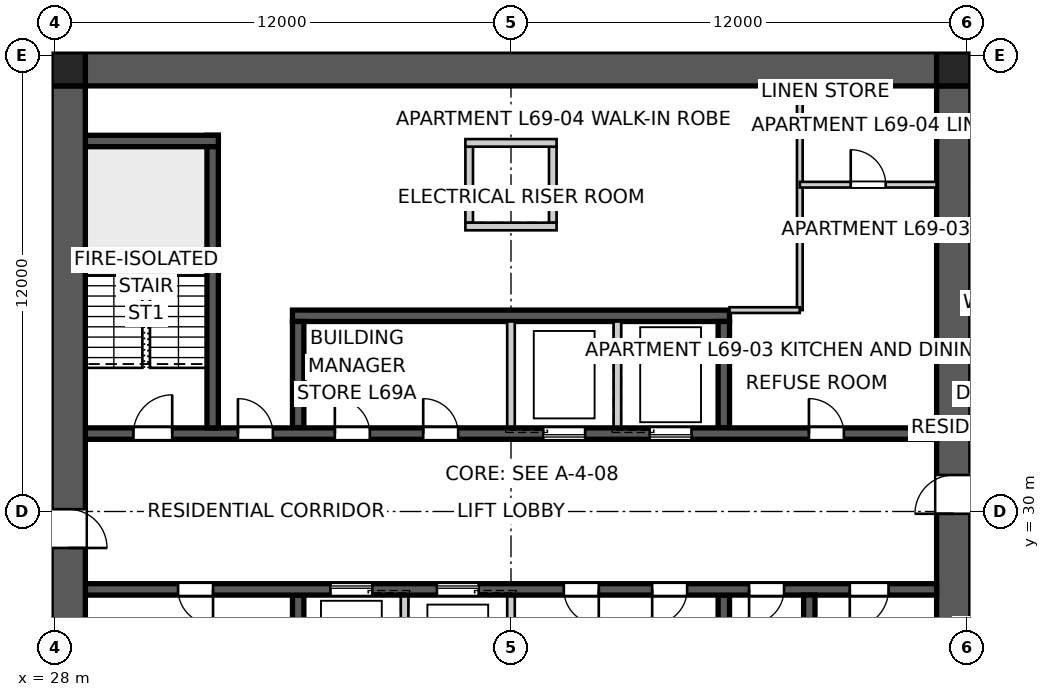
"""IFC4 building model, lengths in metres.
Left out: names, types, materials, properties, quantities, classifications, styles, units other than length and angle.
Written with IfcOpenShell. Run it as: python <this file> out.ifc"""

import sys

from ifc_helpers import new_model, si_unit, direction, frame, frame_2d, origin, origin_2d, place, context, subcontext, project, spatial, polyline, rectangle, outline, extrude, element, fill, save


model = new_model("IFC4")
c1 = context("Model", 3, precision=1e-05, world=origin(), true_north=direction((0.0, 1.0)))
c2 = subcontext(c1, "Body", "Model", "MODEL_VIEW")
j1 = project(units=[si_unit("LENGTHUNIT", "METRE"), si_unit("PLANEANGLEUNIT", "RADIAN")], contexts=[c1])
p1 = place(None, origin())
s1 = spatial("IfcSite", under=j1, at=p1, CompositionType="ELEMENT")
p2 = place(p1, origin())
s2 = spatial("IfcBuilding", under=s1, at=p2, CompositionType="ELEMENT")
p3 = place(p2, frame((0.0, 0.0, 250.6)))
s3 = spatial("IfcBuildingStorey", under=s2, at=p3, CompositionType="ELEMENT", Elevation=250.6)
p4 = place(p3, frame((28.8, 41.65, 0.0), z_axis=(0.0, 0.0, 1.0), x_axis=(1.0, 0.0, 0.0)))
e1 = element("IfcWall", 1, at=p4, inside=s3, PredefinedType="SHEAR", context=c2, shape_type="SweptSolid", body=[
    extrude(outline(polyline([(0.0, -0.45), (22.4, -0.45), (22.4, -0.025), (22.85, -0.025), (22.85, 0.025), (22.4, 0.025), (22.4, 0.45), (0.0, 0.45), (0.0, 0.025), (-0.45, 0.025), (-0.45, -0.025), (0.0, -0.025), (0.0, -0.45)])), origin(), (0.0, 0.0, 1.0), 3.4),
])
p5 = place(p3, frame((51.65, 18.8, 0.0), z_axis=(0.0, 0.0, 1.0), x_axis=(0.0, 1.0, 0.0)))
e2 = element("IfcWall", 2, at=p5, inside=s3, PredefinedType="SHEAR", context=c2, shape_type="SweptSolid", body=[
    extrude(outline(polyline([(0.0, -0.45), (22.4, -0.45), (22.4, -0.025), (22.85, -0.025), (22.85, 0.025), (22.4, 0.025), (22.4, 0.45), (0.0, 0.45), (0.0, 0.025), (-0.45, 0.025), (-0.45, -0.025), (0.0, -0.025), (0.0, -0.45)])), origin(), (0.0, 0.0, 1.0), 3.4),
])
p6 = place(p5, frame((11.14, 0.0, 0.0)))
e3 = element("IfcOpeningElement", 3, at=p6, cuts=e2, PredefinedType="OPENING", context=c2, shape_type="SweptSolid", body=[
    extrude(rectangle(XDim=1.02, YDim=2.4, at=frame_2d((0.51, 1.2))), frame((0.0, 0.46, 0.0), z_axis=(0.0, -1.0, 0.0), x_axis=(1.0, 0.0, 0.0)), (0.0, 0.0, 1.0), 0.92),
])
p7 = place(p3, frame((28.35, 41.2, 0.0), z_axis=(0.0, 0.0, 1.0), x_axis=(0.0, -1.0, 0.0)))
e4 = element("IfcWall", 4, at=p7, inside=s3, PredefinedType="SHEAR", context=c2, shape_type="SweptSolid", body=[
    extrude(outline(polyline([(0.0, -0.45), (22.4, -0.45), (22.4, -0.025), (22.85, -0.025), (22.85, 0.025), (22.4, 0.025), (22.4, 0.45), (0.0, 0.45), (0.0, 0.025), (-0.45, 0.025), (-0.45, -0.025), (0.0, -0.025), (0.0, -0.45)])), origin(), (0.0, 0.0, 1.0), 3.4),
])
p8 = place(p7, frame((11.14, 0.0, 0.0)))
e5 = element("IfcOpeningElement", 5, at=p8, cuts=e4, PredefinedType="OPENING", context=c2, shape_type="SweptSolid", body=[
    extrude(rectangle(XDim=1.02, YDim=2.4, at=frame_2d((0.51, 1.2))), frame((0.0, 0.46, 0.0), z_axis=(0.0, -1.0, 0.0), x_axis=(1.0, 0.0, 0.0)), (0.0, 0.0, 1.0), 0.92),
])
p9 = place(p3, frame((28.8, 32.05, 0.0), z_axis=(0.0, 0.0, 1.0), x_axis=(1.0, 0.0, 0.0)))
e6 = element("IfcWall", 6, at=p9, inside=s3, PredefinedType="SHEAR", context=c2, shape_type="SweptSolid", body=[
    extrude(rectangle(XDim=22.4, YDim=0.3, at=frame_2d((11.2, 0.0))), origin(), (0.0, 0.0, 1.0), 3.4),
])
p10 = place(p9, frame((19.04, 0.0, 0.0)))
e7 = element("IfcOpeningElement", 7, at=p10, cuts=e6, PredefinedType="OPENING", context=c2, shape_type="SweptSolid", body=[
    extrude(rectangle(XDim=0.92, YDim=2.1, at=frame_2d((0.46, 1.05))), frame((0.0, 0.16, 0.0), z_axis=(0.0, -1.0, 0.0), x_axis=(1.0, 0.0, 0.0)), (0.0, 0.0, 1.0), 0.32),
])
p11 = place(p9, frame((1.265, 0.0, 0.0)))
e8 = element("IfcOpeningElement", 8, at=p11, cuts=e6, PredefinedType="OPENING", context=c2, shape_type="SweptSolid", body=[
    extrude(rectangle(XDim=1.02, YDim=2.1, at=frame_2d((0.51, 1.05))), frame((0.0, 0.16, 0.0), z_axis=(0.0, -1.0, 0.0), x_axis=(1.0, 0.0, 0.0)), (0.0, 0.0, 1.0), 0.32),
])
p12 = place(p9, frame((4.015, 0.0, 0.0)))
e9 = element("IfcOpeningElement", 9, at=p12, cuts=e6, PredefinedType="OPENING", context=c2, shape_type="SweptSolid", body=[
    extrude(rectangle(XDim=0.92, YDim=2.1, at=frame_2d((0.46, 1.05))), frame((0.0, 0.16, 0.0), z_axis=(0.0, -1.0, 0.0), x_axis=(1.0, 0.0, 0.0)), (0.0, 0.0, 1.0), 0.32),
])
p13 = place(p9, frame((6.565, 0.0, 0.0)))
e10 = element("IfcOpeningElement", 10, at=p13, cuts=e6, PredefinedType="OPENING", context=c2, shape_type="SweptSolid", body=[
    extrude(rectangle(XDim=0.92, YDim=2.1, at=frame_2d((0.46, 1.05))), frame((0.0, 0.16, 0.0), z_axis=(0.0, -1.0, 0.0), x_axis=(1.0, 0.0, 0.0)), (0.0, 0.0, 1.0), 0.32),
])
p14 = place(p9, frame((8.89, 0.0, 0.0)))
e11 = element("IfcOpeningElement", 11, at=p14, cuts=e6, PredefinedType="OPENING", context=c2, shape_type="SweptSolid", body=[
    extrude(rectangle(XDim=0.92, YDim=2.1, at=frame_2d((0.46, 1.05))), frame((0.0, 0.16, 0.0), z_axis=(0.0, -1.0, 0.0), x_axis=(1.0, 0.0, 0.0)), (0.0, 0.0, 1.0), 0.32),
])
p15 = place(p9, frame((12.05, 0.0, 0.0)))
e12 = element("IfcOpeningElement", 12, at=p15, cuts=e6, PredefinedType="OPENING", context=c2, shape_type="SweptSolid", body=[
    extrude(rectangle(XDim=1.1, YDim=2.1, at=frame_2d((0.55, 1.05))), frame((0.0, 0.16, 0.0), z_axis=(0.0, -1.0, 0.0), x_axis=(1.0, 0.0, 0.0)), (0.0, 0.0, 1.0), 0.32),
])
p16 = place(p9, frame((14.85, 0.0, 0.0)))
e13 = element("IfcOpeningElement", 13, at=p16, cuts=e6, PredefinedType="OPENING", context=c2, shape_type="SweptSolid", body=[
    extrude(rectangle(XDim=1.1, YDim=2.1, at=frame_2d((0.55, 1.05))), frame((0.0, 0.16, 0.0), z_axis=(0.0, -1.0, 0.0), x_axis=(1.0, 0.0, 0.0)), (0.0, 0.0, 1.0), 0.32),
])
p17 = place(p3, frame((51.2, 27.95, 0.0), z_axis=(0.0, 0.0, 1.0), x_axis=(-1.0, 0.0, 0.0)))
e14 = element("IfcWall", 14, at=p17, inside=s3, PredefinedType="SHEAR", context=c2, shape_type="SweptSolid", body=[
    extrude(rectangle(XDim=22.4, YDim=0.3, at=frame_2d((11.2, 0.0))), origin(), (0.0, 0.0, 1.0), 3.4),
])
p18 = place(p17, frame((19.04, 0.0, 0.0)))
e15 = element("IfcOpeningElement", 15, at=p18, cuts=e14, PredefinedType="OPENING", context=c2, shape_type="SweptSolid", body=[
    extrude(rectangle(XDim=0.92, YDim=2.1, at=frame_2d((0.46, 1.05))), frame((0.0, 0.16, 0.0), z_axis=(0.0, -1.0, 0.0), x_axis=(1.0, 0.0, 0.0)), (0.0, 0.0, 1.0), 0.32),
])
p19 = place(p17, frame((1.265, 0.0, 0.0)))
e16 = element("IfcOpeningElement", 16, at=p19, cuts=e14, PredefinedType="OPENING", context=c2, shape_type="SweptSolid", body=[
    extrude(rectangle(XDim=1.02, YDim=2.1, at=frame_2d((0.51, 1.05))), frame((0.0, 0.16, 0.0), z_axis=(0.0, -1.0, 0.0), x_axis=(1.0, 0.0, 0.0)), (0.0, 0.0, 1.0), 0.32),
])
p20 = place(p17, frame((4.015, 0.0, 0.0)))
e17 = element("IfcOpeningElement", 17, at=p20, cuts=e14, PredefinedType="OPENING", context=c2, shape_type="SweptSolid", body=[
    extrude(rectangle(XDim=0.92, YDim=2.1, at=frame_2d((0.46, 1.05))), frame((0.0, 0.16, 0.0), z_axis=(0.0, -1.0, 0.0), x_axis=(1.0, 0.0, 0.0)), (0.0, 0.0, 1.0), 0.32),
])
p21 = place(p17, frame((8.89, 0.0, 0.0)))
e18 = element("IfcOpeningElement", 18, at=p21, cuts=e14, PredefinedType="OPENING", context=c2, shape_type="SweptSolid", body=[
    extrude(rectangle(XDim=0.92, YDim=2.1, at=frame_2d((0.46, 1.05))), frame((0.0, 0.16, 0.0), z_axis=(0.0, -1.0, 0.0), x_axis=(1.0, 0.0, 0.0)), (0.0, 0.0, 1.0), 0.32),
])
p22 = place(p17, frame((6.565, 0.0, 0.0)))
e19 = element("IfcOpeningElement", 19, at=p22, cuts=e14, PredefinedType="OPENING", context=c2, shape_type="SweptSolid", body=[
    extrude(rectangle(XDim=0.92, YDim=2.1, at=frame_2d((0.46, 1.05))), frame((0.0, 0.16, 0.0), z_axis=(0.0, -1.0, 0.0), x_axis=(1.0, 0.0, 0.0)), (0.0, 0.0, 1.0), 0.32),
])
p23 = place(p17, frame((12.05, 0.0, 0.0)))
e20 = element("IfcOpeningElement", 20, at=p23, cuts=e14, PredefinedType="OPENING", context=c2, shape_type="SweptSolid", body=[
    extrude(rectangle(XDim=1.1, YDim=2.1, at=frame_2d((0.55, 1.05))), frame((0.0, 0.16, 0.0), z_axis=(0.0, -1.0, 0.0), x_axis=(1.0, 0.0, 0.0)), (0.0, 0.0, 1.0), 0.32),
])
p24 = place(p17, frame((14.85, 0.0, 0.0)))
e21 = element("IfcOpeningElement", 21, at=p24, cuts=e14, PredefinedType="OPENING", context=c2, shape_type="SweptSolid", body=[
    extrude(rectangle(XDim=1.1, YDim=2.1, at=frame_2d((0.55, 1.05))), frame((0.0, 0.16, 0.0), z_axis=(0.0, -1.0, 0.0), x_axis=(1.0, 0.0, 0.0)), (0.0, 0.0, 1.0), 0.32),
])
p25 = place(p3, frame((34.25, 35.15, 0.0), z_axis=(0.0, 0.0, 1.0), x_axis=(1.0, 0.0, 0.0)))
e22 = element("IfcWall", 22, at=p25, inside=s3, PredefinedType="SHEAR", context=c2, shape_type="SweptSolid", body=[
    extrude(rectangle(XDim=11.5, YDim=0.3, at=frame_2d((5.75, 0.0))), origin(), (0.0, 0.0, 1.0), 3.4),
])
for number, where, z_axis, x_axis in (
    (23, (34.4, 32.2, 0.0), (0.0, 0.0, 1.0), (0.0, 1.0, 0.0)),
    (24, (45.6, 27.8, 0.0), (0.0, 0.0, 1.0), (0.0, -1.0, 0.0)),
):
    element("IfcWall", number, at=place(p3, frame(where, z_axis=z_axis, x_axis=x_axis)), inside=s3, PredefinedType="SHEAR", context=c2, shape_type="SweptSolid", body=[
        extrude(rectangle(XDim=2.8, YDim=0.3, at=frame_2d((1.4, 0.0))), origin(), (0.0, 0.0, 1.0), 3.4),
    ])
for number, where, z_axis, x_axis in (
    (25, (40.0, 32.2, 0.0), (0.0, 0.0, 1.0), (0.0, 1.0, 0.0)),
    (26, (40.0, 27.8, 0.0), (0.0, 0.0, 1.0), (0.0, -1.0, 0.0)),
    (27, (42.8, 32.2, 0.0), (0.0, 0.0, 1.0), (0.0, 1.0, 0.0)),
    (28, (37.2, 27.8, 0.0), (0.0, 0.0, 1.0), (0.0, -1.0, 0.0)),
):
    element("IfcWall", number, at=place(p3, frame(where, z_axis=z_axis, x_axis=x_axis)), inside=s3, PredefinedType="SOLIDWALL", context=c2, shape_type="SweptSolid", body=[
        extrude(rectangle(XDim=2.8, YDim=0.2, at=frame_2d((1.4, 0.0))), origin(), (0.0, 0.0, 1.0), 3.4),
    ])
for number, where, z_axis, x_axis in (
    (29, (45.6, 32.2, 0.0), (0.0, 0.0, 1.0), (0.0, 1.0, 0.0)),
    (30, (34.4, 27.8, 0.0), (0.0, 0.0, 1.0), (0.0, -1.0, 0.0)),
):
    element("IfcWall", number, at=place(p3, frame(where, z_axis=z_axis, x_axis=x_axis)), inside=s3, PredefinedType="SHEAR", context=c2, shape_type="SweptSolid", body=[
        extrude(rectangle(XDim=2.8, YDim=0.3, at=frame_2d((1.4, 0.0))), origin(), (0.0, 0.0, 1.0), 3.4),
    ])
p26 = place(p3, frame((32.15, 32.2, 0.0), z_axis=(0.0, 0.0, 1.0), x_axis=(0.0, 1.0, 0.0)))
e31 = element("IfcWall", 31, at=p26, inside=s3, PredefinedType="SHEAR", context=c2, shape_type="SweptSolid", body=[
    extrude(rectangle(XDim=7.7, YDim=0.3, at=frame_2d((3.85, 0.0))), origin(), (0.0, 0.0, 1.0), 3.4),
])
p27 = place(p3, frame((28.8, 39.75, 0.0), z_axis=(0.0, 0.0, 1.0), x_axis=(1.0, 0.0, 0.0)))
e32 = element("IfcWall", 32, at=p27, inside=s3, PredefinedType="SHEAR", context=c2, shape_type="SweptSolid", body=[
    extrude(rectangle(XDim=3.5, YDim=0.3, at=frame_2d((1.75, 0.0))), origin(), (0.0, 0.0, 1.0), 3.4),
])
p28 = place(p3, frame((47.85, 27.8, 0.0), z_axis=(0.0, 0.0, 1.0), x_axis=(0.0, -1.0, 0.0)))
e33 = element("IfcWall", 33, at=p28, inside=s3, PredefinedType="SHEAR", context=c2, shape_type="SweptSolid", body=[
    extrude(rectangle(XDim=7.7, YDim=0.3, at=frame_2d((3.85, 0.0))), origin(), (0.0, 0.0, 1.0), 3.4),
])
for number, where, z_axis, x_axis in (
    (34, (38.9, 37.6, 0.0), (0.0, 0.0, 1.0), (0.0, 1.0, 0.0)),
    (35, (41.1, 37.6, 0.0), (0.0, 0.0, 1.0), (0.0, 1.0, 0.0)),
):
    element("IfcWall", number, at=place(p3, frame(where, z_axis=z_axis, x_axis=x_axis)), inside=s3, PredefinedType="SOLIDWALL", context=c2, shape_type="SweptSolid", body=[
        extrude(rectangle(XDim=2.0, YDim=0.2, at=frame_2d((1.0, 0.0))), origin(), (0.0, 0.0, 1.0), 3.4),
    ])
for number, where, z_axis, x_axis in (
    (36, (38.8, 37.5, 0.0), (0.0, 0.0, 1.0), (1.0, 0.0, 0.0)),
    (37, (38.8, 39.7, 0.0), (0.0, 0.0, 1.0), (1.0, 0.0, 0.0)),
):
    element("IfcWall", number, at=place(p3, frame(where, z_axis=z_axis, x_axis=x_axis)), inside=s3, PredefinedType="SOLIDWALL", context=c2, shape_type="SweptSolid", body=[
        extrude(rectangle(XDim=2.4, YDim=0.2, at=frame_2d((1.2, 0.0))), origin(), (0.0, 0.0, 1.0), 3.4),
    ])
for number, where, z_axis, x_axis in (
    (38, (51.65, 41.65, 0.0), (0.0, 0.0, 1.0), (1.0, 0.0, 0.0)),
    (39, (28.35, 41.65, 0.0), (0.0, 0.0, 1.0), (1.0, 0.0, 0.0)),
):
    element("IfcColumn", number, at=place(p3, frame(where, z_axis=z_axis, x_axis=x_axis)), inside=s3, PredefinedType="COLUMN", context=c2, shape_type="SweptSolid", body=[
        extrude(rectangle(XDim=0.9, YDim=0.9, at=origin_2d()), origin(), (0.0, 0.0, 1.0), 3.4),
    ])
p29 = place(p3, frame((57.612, 42.332, 0.0), z_axis=(0.0, 0.0, 1.0), x_axis=(-0.819161528122, -0.573562891796, 0.0)))
e40 = element("IfcWall", 40, at=p29, inside=s3, PredefinedType="PARTITIONING", context=c2, shape_type="SweptSolid", body=[
    extrude(rectangle(XDim=6.681, YDim=0.25, at=frame_2d((3.341, 0.0))), origin(), (0.0, 0.0, 1.0), 3.25),
])
p30 = place(p3, frame((47.6, 41.2, 0.0), z_axis=(0.0, 0.0, 1.0), x_axis=(0.0, -1.0, 0.0)))
e41 = element("IfcWall", 41, at=p30, inside=s3, PredefinedType="SOLIDWALL", context=c2, shape_type="SweptSolid", body=[
    extrude(rectangle(XDim=5.9, YDim=0.15, at=frame_2d((2.95, 0.0))), origin(), (0.0, 0.0, 1.0), 3.25),
])
p31 = place(p3, frame((47.6, 35.3, 0.0), z_axis=(0.0, 0.0, 1.0), x_axis=(-1.0, 0.0, 0.0)))
e42 = element("IfcWall", 42, at=p31, inside=s3, PredefinedType="SOLIDWALL", context=c2, shape_type="SweptSolid", body=[
    extrude(rectangle(XDim=1.85, YDim=0.15, at=frame_2d((0.925, 0.0))), origin(), (0.0, 0.0, 1.0), 3.25),
])
p32 = place(p3, frame((47.6, 38.6, 0.0), z_axis=(0.0, 0.0, 1.0), x_axis=(1.0, 0.0, 0.0)))
e43 = element("IfcWall", 43, at=p32, inside=s3, PredefinedType="SOLIDWALL", context=c2, shape_type="SweptSolid", body=[
    extrude(rectangle(XDim=3.6, YDim=0.15, at=frame_2d((1.8, 0.0))), origin(), (0.0, 0.0, 1.0), 3.25),
])
p33 = place(p32, frame((1.34, 0.0, 0.0)))
e44 = element("IfcOpeningElement", 44, at=p33, cuts=e43, PredefinedType="OPENING", context=c2, shape_type="SweptSolid", body=[
    extrude(rectangle(XDim=0.92, YDim=2.1, at=frame_2d((0.46, 1.05))), frame((0.0, 0.085, 0.0), z_axis=(0.0, -1.0, 0.0), x_axis=(1.0, 0.0, 0.0)), (0.0, 0.0, 1.0), 0.17),
])
p34 = place(p3, frame((27.9, 41.619, 0.0), z_axis=(0.0, 0.0, 1.0), x_axis=(0.999397924003, 0.034695669724, 0.0)))
e45 = element("IfcWall", 45, at=p34, inside=s3, PredefinedType="PARTITIONING", context=c2, shape_type="SweptSolid", body=[
    extrude(rectangle(XDim=0.901, YDim=0.12, at=frame_2d((0.45, 0.0))), origin(), (0.0, 0.0, 1.0), 3.25),
])
p35 = place(p10, origin())
e46 = element("IfcDoor", 46, at=p35, inside=s3, OperationType="SINGLE_SWING_LEFT", PredefinedType="DOOR", context=c2, shape_type="SweptSolid", body=[
    extrude(rectangle(XDim=0.92, YDim=2.1, at=frame_2d((0.46, 1.05))), frame((0.0, 0.025, 0.0), z_axis=(0.0, -1.0, 0.0), x_axis=(1.0, 0.0, 0.0)), (0.0, 0.0, 1.0), 0.05),
])
fill(e7, e46)
p36 = place(p18, origin())
e47 = element("IfcDoor", 47, at=p36, inside=s3, OperationType="SINGLE_SWING_LEFT", PredefinedType="DOOR", context=c2, shape_type="SweptSolid", body=[
    extrude(rectangle(XDim=0.92, YDim=2.1, at=frame_2d((0.46, 1.05))), frame((0.0, 0.025, 0.0), z_axis=(0.0, -1.0, 0.0), x_axis=(1.0, 0.0, 0.0)), (0.0, 0.0, 1.0), 0.05),
])
fill(e15, e47)
p37 = place(p19, origin())
e48 = element("IfcDoor", 48, at=p37, inside=s3, OperationType="SINGLE_SWING_RIGHT", PredefinedType="DOOR", context=c2, shape_type="SweptSolid", body=[
    extrude(rectangle(XDim=1.02, YDim=2.1, at=frame_2d((0.51, 1.05))), frame((0.0, 0.025, 0.0), z_axis=(0.0, -1.0, 0.0), x_axis=(1.0, 0.0, 0.0)), (0.0, 0.0, 1.0), 0.05),
])
fill(e16, e48)
p38 = place(p11, origin())
e49 = element("IfcDoor", 49, at=p38, inside=s3, OperationType="SINGLE_SWING_RIGHT", PredefinedType="DOOR", context=c2, shape_type="SweptSolid", body=[
    extrude(rectangle(XDim=1.02, YDim=2.1, at=frame_2d((0.51, 1.05))), frame((0.0, 0.025, 0.0), z_axis=(0.0, -1.0, 0.0), x_axis=(1.0, 0.0, 0.0)), (0.0, 0.0, 1.0), 0.05),
])
fill(e8, e49)
p39 = place(p12, origin())
e50 = element("IfcDoor", 50, at=p39, inside=s3, OperationType="SINGLE_SWING_LEFT", PredefinedType="DOOR", context=c2, shape_type="SweptSolid", body=[
    extrude(rectangle(XDim=0.92, YDim=2.1, at=frame_2d((0.46, 1.05))), frame((0.0, 0.025, 0.0), z_axis=(0.0, -1.0, 0.0), x_axis=(1.0, 0.0, 0.0)), (0.0, 0.0, 1.0), 0.05),
])
fill(e9, e50)
p40 = place(p20, origin())
e51 = element("IfcDoor", 51, at=p40, inside=s3, OperationType="SINGLE_SWING_RIGHT", PredefinedType="DOOR", context=c2, shape_type="SweptSolid", body=[
    extrude(rectangle(XDim=0.92, YDim=2.1, at=frame_2d((0.46, 1.05))), frame((0.0, 0.025, 0.0), z_axis=(0.0, -1.0, 0.0), x_axis=(1.0, 0.0, 0.0)), (0.0, 0.0, 1.0), 0.05),
])
fill(e17, e51)
p41 = place(p33, origin())
e52 = element("IfcDoor", 52, at=p41, inside=s3, OperationType="SINGLE_SWING_LEFT", PredefinedType="DOOR", context=c2, shape_type="SweptSolid", body=[
    extrude(rectangle(XDim=0.92, YDim=2.1, at=frame_2d((0.46, 1.05))), frame((0.0, 0.025, 0.0), z_axis=(0.0, -1.0, 0.0), x_axis=(1.0, 0.0, 0.0)), (0.0, 0.0, 1.0), 0.05),
])
fill(e44, e52)
p42 = place(p13, origin())
e53 = element("IfcDoor", 53, at=p42, inside=s3, OperationType="SINGLE_SWING_LEFT", PredefinedType="DOOR", context=c2, shape_type="SweptSolid", body=[
    extrude(rectangle(XDim=0.92, YDim=2.1, at=frame_2d((0.46, 1.05))), frame((0.0, 0.025, 0.0), z_axis=(0.0, -1.0, 0.0), x_axis=(1.0, 0.0, 0.0)), (0.0, 0.0, 1.0), 0.05),
])
fill(e10, e53)
p43 = place(p14, origin())
e54 = element("IfcDoor", 54, at=p43, inside=s3, OperationType="SINGLE_SWING_LEFT", PredefinedType="DOOR", context=c2, shape_type="SweptSolid", body=[
    extrude(rectangle(XDim=0.92, YDim=2.1, at=frame_2d((0.46, 1.05))), frame((0.0, 0.025, 0.0), z_axis=(0.0, -1.0, 0.0), x_axis=(1.0, 0.0, 0.0)), (0.0, 0.0, 1.0), 0.05),
])
fill(e11, e54)
p44 = place(p21, origin())
e55 = element("IfcDoor", 55, at=p44, inside=s3, OperationType="SINGLE_SWING_LEFT", PredefinedType="DOOR", context=c2, shape_type="SweptSolid", body=[
    extrude(rectangle(XDim=0.92, YDim=2.1, at=frame_2d((0.46, 1.05))), frame((0.0, 0.025, 0.0), z_axis=(0.0, -1.0, 0.0), x_axis=(1.0, 0.0, 0.0)), (0.0, 0.0, 1.0), 0.05),
])
fill(e18, e55)
p45 = place(p22, origin())
e56 = element("IfcDoor", 56, at=p45, inside=s3, OperationType="SINGLE_SWING_RIGHT", PredefinedType="DOOR", context=c2, shape_type="SweptSolid", body=[
    extrude(rectangle(XDim=0.92, YDim=2.1, at=frame_2d((0.46, 1.05))), frame((0.0, 0.025, 0.0), z_axis=(0.0, -1.0, 0.0), x_axis=(1.0, 0.0, 0.0)), (0.0, 0.0, 1.0), 0.05),
])
fill(e19, e56)
p46 = place(p6, origin())
e57 = element("IfcDoor", 57, at=p46, inside=s3, OperationType="SINGLE_SWING_LEFT", PredefinedType="DOOR", context=c2, shape_type="SweptSolid", body=[
    extrude(rectangle(XDim=1.02, YDim=2.4, at=frame_2d((0.51, 1.2))), frame((0.0, 0.025, 0.0), z_axis=(0.0, -1.0, 0.0), x_axis=(1.0, 0.0, 0.0)), (0.0, 0.0, 1.0), 0.05),
])
fill(e3, e57)
p47 = place(p8, origin())
e58 = element("IfcDoor", 58, at=p47, inside=s3, OperationType="SINGLE_SWING_RIGHT", PredefinedType="DOOR", context=c2, shape_type="SweptSolid", body=[
    extrude(rectangle(XDim=1.02, YDim=2.4, at=frame_2d((0.51, 1.2))), frame((0.0, 0.025, 0.0), z_axis=(0.0, -1.0, 0.0), x_axis=(1.0, 0.0, 0.0)), (0.0, 0.0, 1.0), 0.05),
])
fill(e5, e58)
p48 = place(p15, origin())
e59 = element("IfcDoor", 59, at=p48, inside=s3, OperationType="SLIDING_TO_LEFT", PredefinedType="DOOR", context=c2, shape_type="SweptSolid", body=[
    extrude(rectangle(XDim=1.1, YDim=2.1, at=frame_2d((0.55, 1.05))), frame((0.0, 0.025, 0.0), z_axis=(0.0, -1.0, 0.0), x_axis=(1.0, 0.0, 0.0)), (0.0, 0.0, 1.0), 0.05),
])
fill(e12, e59)
p49 = place(p23, origin())
e60 = element("IfcDoor", 60, at=p49, inside=s3, OperationType="SLIDING_TO_LEFT", PredefinedType="DOOR", context=c2, shape_type="SweptSolid", body=[
    extrude(rectangle(XDim=1.1, YDim=2.1, at=frame_2d((0.55, 1.05))), frame((0.0, 0.025, 0.0), z_axis=(0.0, -1.0, 0.0), x_axis=(1.0, 0.0, 0.0)), (0.0, 0.0, 1.0), 0.05),
])
fill(e20, e60)
p50 = place(p16, origin())
e61 = element("IfcDoor", 61, at=p50, inside=s3, OperationType="SLIDING_TO_LEFT", PredefinedType="DOOR", context=c2, shape_type="SweptSolid", body=[
    extrude(rectangle(XDim=1.1, YDim=2.1, at=frame_2d((0.55, 1.05))), frame((0.0, 0.025, 0.0), z_axis=(0.0, -1.0, 0.0), x_axis=(1.0, 0.0, 0.0)), (0.0, 0.0, 1.0), 0.05),
])
fill(e13, e61)
p51 = place(p24, origin())
e62 = element("IfcDoor", 62, at=p51, inside=s3, OperationType="SLIDING_TO_LEFT", PredefinedType="DOOR", context=c2, shape_type="SweptSolid", body=[
    extrude(rectangle(XDim=1.1, YDim=2.1, at=frame_2d((0.55, 1.05))), frame((0.0, 0.025, 0.0), z_axis=(0.0, -1.0, 0.0), x_axis=(1.0, 0.0, 0.0)), (0.0, 0.0, 1.0), 0.05),
])
fill(e21, e62)
save(model, sys.argv[1])
